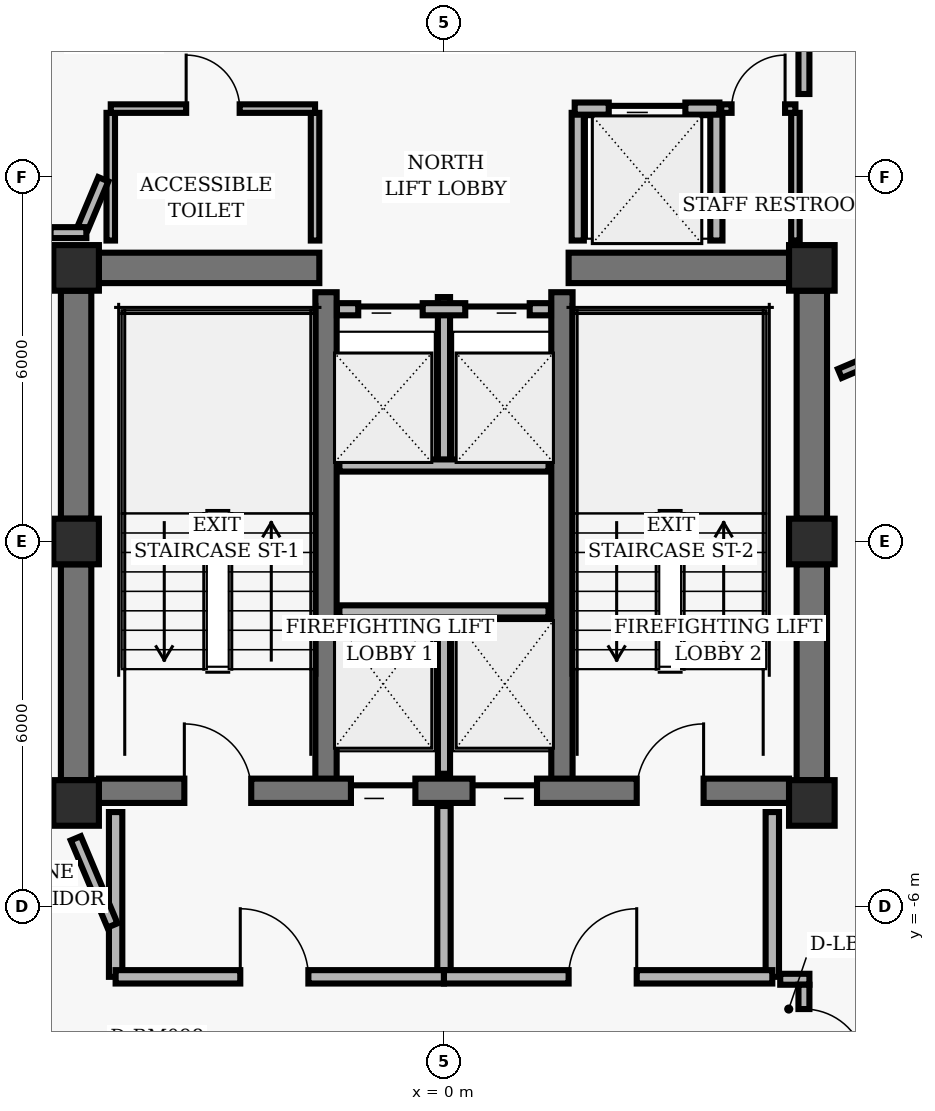
"""IFC4 building model, lengths in metres.
Left out: names, types, materials, properties, quantities, classifications, styles, units other than length and angle.
Written with IfcOpenShell. Run it as: python <this file> out.ifc"""

import sys

from ifc_helpers import new_model, si_unit, direction, frame, frame_2d, origin, origin_2d, place, context, subcontext, project, spatial, rectangle, hollow_rectangle, extrude, element, fill, save


model = new_model("IFC4")
c1 = context("Model", 3, precision=1e-05, world=origin(), true_north=direction((0.0, 1.0)))
c2 = subcontext(c1, "Body", "Model", "MODEL_VIEW")
j1 = project(units=[si_unit("LENGTHUNIT", "METRE"), si_unit("PLANEANGLEUNIT", "RADIAN")], contexts=[c1])
p1 = place(None, origin())
s1 = spatial("IfcSite", under=j1, at=p1, CompositionType="ELEMENT")
p2 = place(p1, origin())
s2 = spatial("IfcBuilding", under=s1, at=p2, CompositionType="ELEMENT")
p3 = place(p2, frame((0.0, 0.0, 196.64)))
s3 = spatial("IfcBuildingStorey", under=s2, at=p3, CompositionType="ELEMENT", Elevation=196.64)
for number, where, z_axis, x_axis in (
    (1, (-6.05, 4.5, 0.0), (0.0, 0.0, 1.0), (1.0, 0.0, 0.0)),
    (2, (6.05, 4.5, 0.0), (0.0, 0.0, 1.0), (1.0, 0.0, 0.0)),
    (3, (-6.05, 0.0, 0.0), (0.0, 0.0, 1.0), (1.0, 0.0, 0.0)),
    (4, (6.05, 0.0, 0.0), (0.0, 0.0, 1.0), (1.0, 0.0, 0.0)),
    (5, (-6.05, -4.3, 0.0), (0.0, 0.0, 1.0), (1.0, 0.0, 0.0)),
    (6, (6.05, -4.3, 0.0), (0.0, 0.0, 1.0), (1.0, 0.0, 0.0)),
):
    element("IfcColumn", number, at=place(p3, frame(where, z_axis=z_axis, x_axis=x_axis)), inside=s3, PredefinedType="COLUMN", context=c2, shape_type="SweptSolid", body=[
        extrude(hollow_rectangle(XDim=0.75, YDim=0.75, WallThickness=0.05, InnerFilletRadius=0.02, OuterFilletRadius=0.04, at=origin_2d()), origin(), (0.0, 0.0, 1.0), 3.04),
    ])
p4 = place(p3, frame((-6.05, 0.375, 0.0), z_axis=(0.0, 0.0, 1.0), x_axis=(0.0, 1.0, 0.0)))
e7 = element("IfcWall", 7, at=p4, inside=s3, PredefinedType="SHEAR", context=c2, shape_type="SweptSolid", body=[
    extrude(rectangle(XDim=3.75, YDim=0.5, at=frame_2d((1.875, 0.0))), origin(), (0.0, 0.0, 1.0), 2.798),
])
p5 = place(p3, frame((-6.05, -3.925, 0.0), z_axis=(0.0, 0.0, 1.0), x_axis=(0.0, 1.0, 0.0)))
e8 = element("IfcWall", 8, at=p5, inside=s3, PredefinedType="SHEAR", context=c2, shape_type="SweptSolid", body=[
    extrude(rectangle(XDim=3.55, YDim=0.5, at=frame_2d((1.775, 0.0))), origin(), (0.0, 0.0, 1.0), 2.798),
])
p6 = place(p3, frame((6.05, 0.375, 0.0), z_axis=(0.0, 0.0, 1.0), x_axis=(0.0, 1.0, 0.0)))
e9 = element("IfcWall", 9, at=p6, inside=s3, PredefinedType="SHEAR", context=c2, shape_type="SweptSolid", body=[
    extrude(rectangle(XDim=3.75, YDim=0.5, at=frame_2d((1.875, 0.0))), origin(), (0.0, 0.0, 1.0), 2.798),
])
p7 = place(p3, frame((6.05, -3.925, 0.0), z_axis=(0.0, 0.0, 1.0), x_axis=(0.0, 1.0, 0.0)))
e10 = element("IfcWall", 10, at=p7, inside=s3, PredefinedType="SHEAR", context=c2, shape_type="SweptSolid", body=[
    extrude(rectangle(XDim=3.55, YDim=0.5, at=frame_2d((1.775, 0.0))), origin(), (0.0, 0.0, 1.0), 2.798),
])
for number, where, z_axis, x_axis in (
    (11, (-1.94, -4.1, 0.0), (0.0, 0.0, 1.0), (0.0, 1.0, 0.0)),
    (12, (1.94, -4.1, 0.0), (0.0, 0.0, 1.0), (0.0, 1.0, 0.0)),
):
    element("IfcWall", number, at=place(p3, frame(where, z_axis=z_axis, x_axis=x_axis)), inside=s3, PredefinedType="SHEAR", context=c2, shape_type="SweptSolid", body=[
        extrude(rectangle(XDim=8.2, YDim=0.35, at=frame_2d((4.1, 0.0))), origin(), (0.0, 0.0, 1.0), 2.798),
    ])
p8 = place(p3, frame((-5.675, -4.1, 0.0), z_axis=(0.0, 0.0, 1.0), x_axis=(1.0, 0.0, 0.0)))
e13 = element("IfcWall", 13, at=p8, inside=s3, PredefinedType="SHEAR", context=c2, shape_type="SweptSolid", body=[
    extrude(rectangle(XDim=11.35, YDim=0.4, at=frame_2d((5.675, 0.0))), origin(), (0.0, 0.0, 1.0), 2.798),
])
p9 = place(p8, frame((1.405, 0.0, 0.0)))
e14 = element("IfcOpeningElement", 14, at=p9, cuts=e13, PredefinedType="OPENING", context=c2, shape_type="SweptSolid", body=[
    extrude(rectangle(XDim=1.1, YDim=2.04, at=frame_2d((0.55, 1.02))), frame((0.0, 0.21, 0.0), z_axis=(0.0, -1.0, 0.0), x_axis=(1.0, 0.0, 0.0)), (0.0, 0.0, 1.0), 0.42),
])
p10 = place(p8, frame((8.845, 0.0, 0.0)))
e15 = element("IfcOpeningElement", 15, at=p10, cuts=e13, PredefinedType="OPENING", context=c2, shape_type="SweptSolid", body=[
    extrude(rectangle(XDim=1.1, YDim=2.04, at=frame_2d((0.55, 1.02))), frame((0.0, 0.21, 0.0), z_axis=(0.0, -1.0, 0.0), x_axis=(1.0, 0.0, 0.0)), (0.0, 0.0, 1.0), 0.42),
])
p11 = place(p8, frame((4.145, 0.0, 0.0)))
e16 = element("IfcOpeningElement", 16, at=p11, cuts=e13, PredefinedType="OPENING", context=c2, shape_type="SweptSolid", body=[
    extrude(rectangle(XDim=1.06, YDim=2.04, at=frame_2d((0.53, 1.02))), frame((0.0, 0.21, 0.0), z_axis=(0.0, -1.0, 0.0), x_axis=(1.0, 0.0, 0.0)), (0.0, 0.0, 1.0), 0.42),
])
p12 = place(p8, frame((6.145, 0.0, 0.0)))
e17 = element("IfcOpeningElement", 17, at=p12, cuts=e13, PredefinedType="OPENING", context=c2, shape_type="SweptSolid", body=[
    extrude(rectangle(XDim=1.06, YDim=2.04, at=frame_2d((0.53, 1.02))), frame((0.0, 0.21, 0.0), z_axis=(0.0, -1.0, 0.0), x_axis=(1.0, 0.0, 0.0)), (0.0, 0.0, 1.0), 0.42),
])
for number, where, z_axis, x_axis in (
    (18, (-5.675, 4.5, 0.0), (0.0, 0.0, 1.0), (1.0, 0.0, 0.0)),
    (19, (2.05, 4.5, 0.0), (0.0, 0.0, 1.0), (1.0, 0.0, 0.0)),
):
    element("IfcWall", number, at=place(p3, frame(where, z_axis=z_axis, x_axis=x_axis)), inside=s3, PredefinedType="SHEAR", context=c2, shape_type="SweptSolid", body=[
        extrude(rectangle(XDim=3.625, YDim=0.5, at=frame_2d((1.812, 0.0))), origin(), (0.0, 0.0, 1.0), 2.798),
    ])
p13 = place(p3, frame((0.0, -3.82, 0.0), z_axis=(0.0, 0.0, 1.0), x_axis=(0.0, 1.0, 0.0)))
e20 = element("IfcWall", 20, at=p13, inside=s3, PredefinedType="PARTITIONING", context=c2, shape_type="SweptSolid", body=[
    extrude(rectangle(XDim=2.67, YDim=0.2, at=frame_2d((1.335, 0.0))), origin(), (0.0, 0.0, 1.0), 2.773),
])
p14 = place(p3, frame((-1.72, -1.15, 0.0), z_axis=(0.0, 0.0, 1.0), x_axis=(1.0, 0.0, 0.0)))
e21 = element("IfcWall", 21, at=p14, inside=s3, PredefinedType="PARTITIONING", context=c2, shape_type="SweptSolid", body=[
    extrude(rectangle(XDim=3.44, YDim=0.2, at=frame_2d((1.72, 0.0))), origin(), (0.0, 0.0, 1.0), 2.773),
])
for number, where, z_axis, x_axis in (
    (22, (-5.4, -7.16, 0.0), (0.0, 0.0, 1.0), (0.0, 1.0, 0.0)),
    (23, (5.4, -7.16, 0.0), (0.0, 0.0, 1.0), (0.0, 1.0, 0.0)),
):
    element("IfcWall", number, at=place(p3, frame(where, z_axis=z_axis, x_axis=x_axis)), inside=s3, PredefinedType="PARTITIONING", context=c2, shape_type="SweptSolid", body=[
        extrude(rectangle(XDim=2.71, YDim=0.22, at=frame_2d((1.355, 0.0))), origin(), (0.0, 0.0, 1.0), 2.773),
    ])
p15 = place(p3, frame((0.0, -7.16, 0.0), z_axis=(0.0, 0.0, 1.0), x_axis=(0.0, 1.0, 0.0)))
e24 = element("IfcWall", 24, at=p15, inside=s3, PredefinedType="PARTITIONING", context=c2, shape_type="SweptSolid", body=[
    extrude(rectangle(XDim=2.81, YDim=0.22, at=frame_2d((1.405, 0.0))), origin(), (0.0, 0.0, 1.0), 2.773),
])
p16 = place(p3, frame((-5.4, -7.16, 0.0), z_axis=(0.0, 0.0, 1.0), x_axis=(1.0, 0.0, 0.0)))
e25 = element("IfcWall", 25, at=p16, inside=s3, PredefinedType="PARTITIONING", context=c2, shape_type="SweptSolid", body=[
    extrude(rectangle(XDim=5.4, YDim=0.22, at=frame_2d((2.7, 0.0))), origin(), (0.0, 0.0, 1.0), 2.395),
])
p17 = place(p16, frame((2.05, 0.0, 0.0)))
e26 = element("IfcOpeningElement", 26, at=p17, cuts=e25, PredefinedType="OPENING", context=c2, shape_type="SweptSolid", body=[
    extrude(rectangle(XDim=1.12, YDim=2.02, at=frame_2d((0.56, 1.01))), frame((0.0, 0.12, 0.0), z_axis=(0.0, -1.0, 0.0), x_axis=(1.0, 0.0, 0.0)), (0.0, 0.0, 1.0), 0.24),
])
p18 = place(p3, frame((0.0, -7.16, 0.0), z_axis=(0.0, 0.0, 1.0), x_axis=(1.0, 0.0, 0.0)))
e27 = element("IfcWall", 27, at=p18, inside=s3, PredefinedType="PARTITIONING", context=c2, shape_type="SweptSolid", body=[
    extrude(rectangle(XDim=5.4, YDim=0.22, at=frame_2d((2.7, 0.0))), origin(), (0.0, 0.0, 1.0), 2.773),
])
p19 = place(p18, frame((2.05, 0.0, 0.0)))
e28 = element("IfcOpeningElement", 28, at=p19, cuts=e27, PredefinedType="OPENING", context=c2, shape_type="SweptSolid", body=[
    extrude(rectangle(XDim=1.12, YDim=2.02, at=frame_2d((0.56, 1.01))), frame((0.0, 0.12, 0.0), z_axis=(0.0, -1.0, 0.0), x_axis=(1.0, 0.0, 0.0)), (0.0, 0.0, 1.0), 0.24),
])
p20 = place(p3, frame((0.0, 1.25, 0.0), z_axis=(0.0, 0.0, 1.0), x_axis=(0.0, 1.0, 0.0)))
e29 = element("IfcWall", 29, at=p20, inside=s3, PredefinedType="PARTITIONING", context=c2, shape_type="SweptSolid", body=[
    extrude(rectangle(XDim=2.77, YDim=0.2, at=frame_2d((1.385, 0.0))), origin(), (0.0, 0.0, 1.0), 2.773),
])
p21 = place(p3, frame((-1.72, 1.25, 0.0), z_axis=(0.0, 0.0, 1.0), x_axis=(1.0, 0.0, 0.0)))
e30 = element("IfcWall", 30, at=p21, inside=s3, PredefinedType="PARTITIONING", context=c2, shape_type="SweptSolid", body=[
    extrude(rectangle(XDim=3.44, YDim=0.2, at=frame_2d((1.72, 0.0))), origin(), (0.0, 0.0, 1.0), 2.773),
])
p22 = place(p3, frame((-1.76, 3.82, 0.0), z_axis=(0.0, 0.0, 1.0), x_axis=(1.0, 0.0, 0.0)))
e31 = element("IfcWall", 31, at=p22, inside=s3, PredefinedType="PARTITIONING", context=c2, shape_type="SweptSolid", body=[
    extrude(rectangle(XDim=3.52, YDim=0.2, at=frame_2d((1.76, 0.0))), origin(), (0.0, 0.0, 1.0), 2.773),
])
p23 = place(p22, frame((0.35, 0.0, 0.0)))
e32 = element("IfcOpeningElement", 32, at=p23, cuts=e31, PredefinedType="OPENING", context=c2, shape_type="SweptSolid", body=[
    extrude(rectangle(XDim=1.06, YDim=2.04, at=frame_2d((0.53, 1.02))), frame((0.0, 0.11, 0.0), z_axis=(0.0, -1.0, 0.0), x_axis=(1.0, 0.0, 0.0)), (0.0, 0.0, 1.0), 0.22),
])
p24 = place(p22, frame((2.11, 0.0, 0.0)))
e33 = element("IfcOpeningElement", 33, at=p24, cuts=e31, PredefinedType="OPENING", context=c2, shape_type="SweptSolid", body=[
    extrude(rectangle(XDim=1.06, YDim=2.04, at=frame_2d((0.53, 1.02))), frame((0.0, 0.11, 0.0), z_axis=(0.0, -1.0, 0.0), x_axis=(1.0, 0.0, 0.0)), (0.0, 0.0, 1.0), 0.22),
])
for number, where, z_axis, x_axis in (
    (34, (2.2, 4.95, 0.0), (0.0, 0.0, 1.0), (0.0, 1.0, 0.0)),
    (35, (4.48, 4.95, 0.0), (0.0, 0.0, 1.0), (0.0, 1.0, 0.0)),
):
    element("IfcWall", number, at=place(p3, frame(where, z_axis=z_axis, x_axis=x_axis)), inside=s3, PredefinedType="PARTITIONING", context=c2, shape_type="SweptSolid", body=[
        extrude(rectangle(XDim=2.1, YDim=0.2, at=frame_2d((1.05, 0.0))), origin(), (0.0, 0.0, 1.0), 2.773),
    ])
p25 = place(p3, frame((2.15, 7.12, 0.0), z_axis=(0.0, 0.0, 1.0), x_axis=(1.0, 0.0, 0.0)))
e36 = element("IfcWall", 36, at=p25, inside=s3, PredefinedType="PARTITIONING", context=c2, shape_type="SweptSolid", body=[
    extrude(rectangle(XDim=2.38, YDim=0.2, at=frame_2d((1.19, 0.0))), origin(), (0.0, 0.0, 1.0), 2.773),
])
p26 = place(p25, frame((0.56, 0.0, 0.0)))
e37 = element("IfcOpeningElement", 37, at=p26, cuts=e36, PredefinedType="OPENING", context=c2, shape_type="SweptSolid", body=[
    extrude(rectangle(XDim=1.26, YDim=2.06, at=frame_2d((0.63, 1.03))), frame((0.0, 0.11, 0.0), z_axis=(0.0, -1.0, 0.0), x_axis=(1.0, 0.0, 0.0)), (0.0, 0.0, 1.0), 0.22),
])
for number, where, z_axis, x_axis in (
    (38, (-5.48, 4.95, 0.0), (0.0, 0.0, 1.0), (0.0, 1.0, 0.0)),
    (39, (-2.12, 4.95, 0.0), (0.0, 0.0, 1.0), (0.0, 1.0, 0.0)),
):
    element("IfcWall", number, at=place(p3, frame(where, z_axis=z_axis, x_axis=x_axis)), inside=s3, PredefinedType="PARTITIONING", context=c2, shape_type="SweptSolid", body=[
        extrude(rectangle(XDim=2.1, YDim=0.14, at=frame_2d((1.05, 0.0))), origin(), (0.0, 0.0, 1.0), 2.773),
    ])
p27 = place(p3, frame((-5.48, 7.12, 0.0), z_axis=(0.0, 0.0, 1.0), x_axis=(1.0, 0.0, 0.0)))
e40 = element("IfcWall", 40, at=p27, inside=s3, PredefinedType="PARTITIONING", context=c2, shape_type="SweptSolid", body=[
    extrude(rectangle(XDim=3.36, YDim=0.14, at=frame_2d((1.68, 0.0))), origin(), (0.0, 0.0, 1.0), 2.773),
])
p28 = place(p27, frame((1.24, 0.0, 0.0)))
e41 = element("IfcOpeningElement", 41, at=p28, cuts=e40, PredefinedType="OPENING", context=c2, shape_type="SweptSolid", body=[
    extrude(rectangle(XDim=0.88, YDim=2.02, at=frame_2d((0.44, 1.01))), frame((0.0, 0.08, 0.0), z_axis=(0.0, -1.0, 0.0), x_axis=(1.0, 0.0, 0.0)), (0.0, 0.0, 1.0), 0.16),
])
p29 = place(p3, frame((5.78, 4.95, 0.0), z_axis=(0.0, 0.0, 1.0), x_axis=(0.0, 1.0, 0.0)))
e42 = element("IfcWall", 42, at=p29, inside=s3, PredefinedType="PARTITIONING", context=c2, shape_type="SweptSolid", body=[
    extrude(rectangle(XDim=2.1, YDim=0.14, at=frame_2d((1.05, 0.0))), origin(), (0.0, 0.0, 1.0), 2.253),
])
p30 = place(p3, frame((4.56, 7.12, 0.0), z_axis=(0.0, 0.0, 1.0), x_axis=(1.0, 0.0, 0.0)))
e43 = element("IfcWall", 43, at=p30, inside=s3, PredefinedType="PARTITIONING", context=c2, shape_type="SweptSolid", body=[
    extrude(rectangle(XDim=1.22, YDim=0.14, at=frame_2d((0.61, 0.0))), origin(), (0.0, 0.0, 1.0), 2.773),
])
p31 = place(p30, frame((0.17, 0.0, 0.0)))
e44 = element("IfcOpeningElement", 44, at=p31, cuts=e43, PredefinedType="OPENING", context=c2, shape_type="SweptSolid", body=[
    extrude(rectangle(XDim=0.88, YDim=2.02, at=frame_2d((0.44, 1.01))), frame((0.0, 0.08, 0.0), z_axis=(0.0, -1.0, 0.0), x_axis=(1.0, 0.0, 0.0)), (0.0, 0.0, 1.0), 0.16),
])
p32 = place(p3, frame((5.92, 9.16, 0.0), z_axis=(0.0, 0.0, 1.0), x_axis=(0.0, -1.0, 0.0)))
e45 = element("IfcWall", 45, at=p32, inside=s3, PredefinedType="PARTITIONING", context=c2, shape_type="SweptSolid", body=[
    extrude(rectangle(XDim=1.8, YDim=0.18, at=frame_2d((0.9, 0.0))), origin(), (0.0, 0.0, 1.0), 2.773),
])
p33 = place(p3, frame((-5.602, 5.958, 0.0), z_axis=(0.0, 0.0, 1.0), x_axis=(-0.387588639363, -0.921832439566, 0.0)))
e46 = element("IfcWall", 46, at=p33, inside=s3, PredefinedType="PARTITIONING", context=c2, shape_type="SweptSolid", body=[
    extrude(rectangle(XDim=0.862, YDim=0.18, at=frame_2d((0.431, 0.0))), origin(), (0.0, 0.0, 1.0), 2.773),
])
p34 = place(p3, frame((-5.881, 5.08, 0.0), z_axis=(0.0, 0.0, 1.0), x_axis=(-1.0, 0.0, 0.0)))
e47 = element("IfcWall", 47, at=p34, inside=s3, PredefinedType="PARTITIONING", context=c2, shape_type="SweptSolid", body=[
    extrude(rectangle(XDim=0.589, YDim=0.18, at=frame_2d((0.294, 0.0))), origin(), (0.0, 0.0, 1.0), 2.773),
])
p35 = place(p3, frame((-6.055, -4.882, 0.0), z_axis=(0.0, 0.0, 1.0), x_axis=(0.387579540458, -0.921836265189, 0.0)))
e48 = element("IfcWall", 48, at=p35, inside=s3, PredefinedType="PARTITIONING", context=c2, shape_type="SweptSolid", body=[
    extrude(rectangle(XDim=1.555, YDim=0.18, at=frame_2d((0.777, 0.0))), origin(), (0.0, 0.0, 1.0), 2.253),
])
p36 = place(p3, frame((5.53, -7.2, 0.0), z_axis=(0.0, 0.0, 1.0), x_axis=(1.0, 0.0, 0.0)))
e49 = element("IfcWall", 49, at=p36, inside=s3, PredefinedType="PARTITIONING", context=c2, shape_type="SweptSolid", body=[
    extrude(rectangle(XDim=0.48, YDim=0.18, at=frame_2d((0.24, 0.0))), origin(), (0.0, 0.0, 1.0), 2.773),
])
p37 = place(p3, frame((5.92, -7.29, 0.0), z_axis=(0.0, 0.0, 1.0), x_axis=(0.0, -1.0, 0.0)))
e50 = element("IfcWall", 50, at=p37, inside=s3, PredefinedType="PARTITIONING", context=c2, shape_type="SweptSolid", body=[
    extrude(rectangle(XDim=1.82, YDim=0.18, at=frame_2d((0.91, 0.0))), origin(), (0.0, 0.0, 1.0), 2.773),
])
p38 = place(p37, frame((0.4, 0.0, 0.0)))
e51 = element("IfcOpeningElement", 51, at=p38, cuts=e50, PredefinedType="OPENING", context=c2, shape_type="SweptSolid", body=[
    extrude(rectangle(XDim=1.02, YDim=2.02, at=frame_2d((0.51, 1.01))), frame((0.0, 0.1, 0.0), z_axis=(0.0, -1.0, 0.0), x_axis=(1.0, 0.0, 0.0)), (0.0, 0.0, 1.0), 0.2),
])
p39 = place(p3, frame((6.51, 2.763, 0.0), z_axis=(0.0, 0.0, 1.0), x_axis=(0.920487144923, 0.390772844543, 0.0)))
e52 = element("IfcWall", 52, at=p39, inside=s3, PredefinedType="PARTITIONING", context=c2, shape_type="SweptSolid", body=[
    extrude(rectangle(XDim=5.904, YDim=0.16, at=frame_2d((2.952, 0.0))), origin(), (0.0, 0.0, 1.0), 2.773),
])
p40 = place(p9, origin())
e53 = element("IfcDoor", 53, at=p40, inside=s3, OperationType="SINGLE_SWING_LEFT", PredefinedType="DOOR", context=c2, shape_type="SweptSolid", body=[
    extrude(rectangle(XDim=1.1, YDim=2.04, at=frame_2d((0.55, 1.02))), frame((0.0, 0.025, 0.0), z_axis=(0.0, -1.0, 0.0), x_axis=(1.0, 0.0, 0.0)), (0.0, 0.0, 1.0), 0.05),
])
fill(e14, e53)
p41 = place(p10, origin())
e54 = element("IfcDoor", 54, at=p41, inside=s3, OperationType="SINGLE_SWING_RIGHT", PredefinedType="DOOR", context=c2, shape_type="SweptSolid", body=[
    extrude(rectangle(XDim=1.1, YDim=2.04, at=frame_2d((0.55, 1.02))), frame((0.0, 0.025, 0.0), z_axis=(0.0, -1.0, 0.0), x_axis=(1.0, 0.0, 0.0)), (0.0, 0.0, 1.0), 0.05),
])
fill(e15, e54)
p42 = place(p11, origin())
e55 = element("IfcDoor", 55, at=p42, inside=s3, OperationType="SLIDING_TO_LEFT", PredefinedType="DOOR", context=c2, shape_type="SweptSolid", body=[
    extrude(rectangle(XDim=1.06, YDim=2.04, at=frame_2d((0.53, 1.02))), frame((0.0, 0.025, 0.0), z_axis=(0.0, -1.0, 0.0), x_axis=(1.0, 0.0, 0.0)), (0.0, 0.0, 1.0), 0.05),
])
fill(e16, e55)
p43 = place(p12, origin())
e56 = element("IfcDoor", 56, at=p43, inside=s3, OperationType="SLIDING_TO_RIGHT", PredefinedType="DOOR", context=c2, shape_type="SweptSolid", body=[
    extrude(rectangle(XDim=1.06, YDim=2.04, at=frame_2d((0.53, 1.02))), frame((0.0, 0.025, 0.0), z_axis=(0.0, -1.0, 0.0), x_axis=(1.0, 0.0, 0.0)), (0.0, 0.0, 1.0), 0.05),
])
fill(e17, e56)
p44 = place(p17, origin())
e57 = element("IfcDoor", 57, at=p44, inside=s3, OperationType="SINGLE_SWING_LEFT", PredefinedType="DOOR", context=c2, shape_type="SweptSolid", body=[
    extrude(rectangle(XDim=1.12, YDim=2.02, at=frame_2d((0.56, 1.01))), frame((0.0, 0.025, 0.0), z_axis=(0.0, -1.0, 0.0), x_axis=(1.0, 0.0, 0.0)), (0.0, 0.0, 1.0), 0.05),
])
fill(e26, e57)
p45 = place(p19, origin())
e58 = element("IfcDoor", 58, at=p45, inside=s3, OperationType="SINGLE_SWING_RIGHT", PredefinedType="DOOR", context=c2, shape_type="SweptSolid", body=[
    extrude(rectangle(XDim=1.12, YDim=2.02, at=frame_2d((0.56, 1.01))), frame((0.0, 0.025, 0.0), z_axis=(0.0, -1.0, 0.0), x_axis=(1.0, 0.0, 0.0)), (0.0, 0.0, 1.0), 0.05),
])
fill(e28, e58)
p46 = place(p23, origin())
e59 = element("IfcDoor", 59, at=p46, inside=s3, OperationType="SLIDING_TO_LEFT", PredefinedType="DOOR", context=c2, shape_type="SweptSolid", body=[
    extrude(rectangle(XDim=1.06, YDim=2.04, at=frame_2d((0.53, 1.02))), frame((0.0, 0.025, 0.0), z_axis=(0.0, -1.0, 0.0), x_axis=(1.0, 0.0, 0.0)), (0.0, 0.0, 1.0), 0.05),
])
fill(e32, e59)
p47 = place(p24, origin())
e60 = element("IfcDoor", 60, at=p47, inside=s3, OperationType="SLIDING_TO_RIGHT", PredefinedType="DOOR", context=c2, shape_type="SweptSolid", body=[
    extrude(rectangle(XDim=1.06, YDim=2.04, at=frame_2d((0.53, 1.02))), frame((0.0, 0.025, 0.0), z_axis=(0.0, -1.0, 0.0), x_axis=(1.0, 0.0, 0.0)), (0.0, 0.0, 1.0), 0.05),
])
fill(e33, e60)
p48 = place(p26, origin())
e61 = element("IfcDoor", 61, at=p48, inside=s3, OperationType="SLIDING_TO_LEFT", PredefinedType="DOOR", context=c2, shape_type="SweptSolid", body=[
    extrude(rectangle(XDim=1.26, YDim=2.06, at=frame_2d((0.63, 1.03))), frame((0.0, 0.025, 0.0), z_axis=(0.0, -1.0, 0.0), x_axis=(1.0, 0.0, 0.0)), (0.0, 0.0, 1.0), 0.05),
])
fill(e37, e61)
p49 = place(p28, origin())
e62 = element("IfcDoor", 62, at=p49, inside=s3, OperationType="SINGLE_SWING_LEFT", PredefinedType="DOOR", context=c2, shape_type="SweptSolid", body=[
    extrude(rectangle(XDim=0.88, YDim=2.02, at=frame_2d((0.44, 1.01))), frame((0.0, 0.025, 0.0), z_axis=(0.0, -1.0, 0.0), x_axis=(1.0, 0.0, 0.0)), (0.0, 0.0, 1.0), 0.05),
])
fill(e41, e62)
p50 = place(p31, origin())
e63 = element("IfcDoor", 63, at=p50, inside=s3, OperationType="SINGLE_SWING_RIGHT", PredefinedType="DOOR", context=c2, shape_type="SweptSolid", body=[
    extrude(rectangle(XDim=0.88, YDim=2.02, at=frame_2d((0.44, 1.01))), frame((0.0, 0.025, 0.0), z_axis=(0.0, -1.0, 0.0), x_axis=(1.0, 0.0, 0.0)), (0.0, 0.0, 1.0), 0.05),
])
fill(e44, e63)
p51 = place(p38, origin())
e64 = element("IfcDoor", 64, at=p51, inside=s3, OperationType="SINGLE_SWING_RIGHT", PredefinedType="DOOR", context=c2, shape_type="SweptSolid", body=[
    extrude(rectangle(XDim=1.02, YDim=2.02, at=frame_2d((0.51, 1.01))), frame((0.0, 0.025, 0.0), z_axis=(0.0, -1.0, 0.0), x_axis=(1.0, 0.0, 0.0)), (0.0, 0.0, 1.0), 0.05),
])
fill(e51, e64)
save(model, sys.argv[1])
